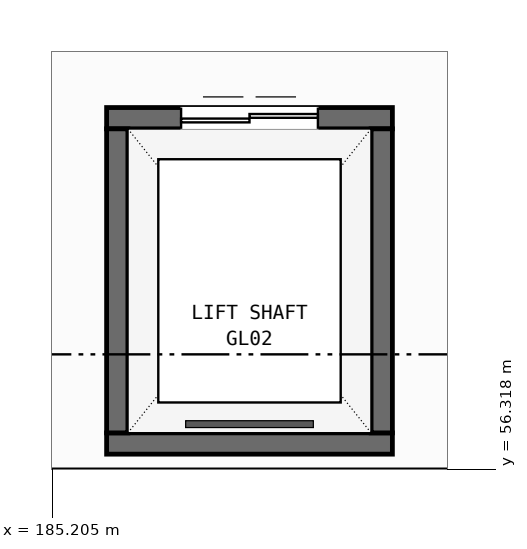
"""IFC4 building model, lengths in metres.
Left out: names, types, materials, properties, quantities, classifications, styles, units other than length and angle.
Written with IfcOpenShell. Run it as: python <this file> out.ifc"""

import sys

from ifc_helpers import new_model, si_unit, direction, frame, frame_2d, origin, place, context, subcontext, project, spatial, rectangle, extrude, element, fill, save


model = new_model("IFC4")
c1 = context("Model", 3, precision=1e-05, world=origin(), true_north=direction((0.0, 1.0)))
c2 = subcontext(c1, "Body", "Model", "MODEL_VIEW")
j1 = project(units=[si_unit("LENGTHUNIT", "METRE"), si_unit("PLANEANGLEUNIT", "RADIAN")], contexts=[c1])
p1 = place(None, origin())
s1 = spatial("IfcSite", under=j1, at=p1, CompositionType="ELEMENT")
p2 = place(p1, origin())
s2 = spatial("IfcBuilding", under=s1, at=p2, CompositionType="ELEMENT")
p3 = place(p2, frame((0.0, 0.0, 6.0)))
s3 = spatial("IfcBuildingStorey", under=s2, at=p3, CompositionType="ELEMENT", Elevation=6.0)
p4 = place(p3, frame((185.92, 56.66, 0.0), z_axis=(0.0, 0.0, 1.0), x_axis=(1.0, 0.0, 0.0)))
e1 = element("IfcWall", 1, at=p4, inside=s3, PredefinedType="SHEAR", context=c2, shape_type="SweptSolid", body=[
    extrude(rectangle(XDim=3.76, YDim=0.28, at=frame_2d((1.88, 0.0))), origin(), (0.0, 0.0, 1.0), 5.4),
])
p5 = place(p3, frame((185.92, 60.94, 0.0), z_axis=(0.0, 0.0, 1.0), x_axis=(1.0, 0.0, 0.0)))
e2 = element("IfcWall", 2, at=p5, inside=s3, PredefinedType="SHEAR", context=c2, shape_type="SweptSolid", body=[
    extrude(rectangle(XDim=3.76, YDim=0.28, at=frame_2d((1.88, 0.0))), origin(), (0.0, 0.0, 1.0), 5.4),
])
p6 = place(p5, frame((0.98, 0.0, 0.0)))
e3 = element("IfcOpeningElement", 3, at=p6, cuts=e2, PredefinedType="OPENING", context=c2, shape_type="SweptSolid", body=[
    extrude(rectangle(XDim=1.8, YDim=2.3, at=frame_2d((0.9, 1.15))), frame((0.0, 0.15, 0.0), z_axis=(0.0, -1.0, 0.0), x_axis=(1.0, 0.0, 0.0)), (0.0, 0.0, 1.0), 0.3),
])
for number, where, z_axis, x_axis in (
    (4, (186.06, 56.8, 0.0), (0.0, 0.0, 1.0), (0.0, 1.0, 0.0)),
    (5, (189.54, 56.8, 0.0), (0.0, 0.0, 1.0), (0.0, 1.0, 0.0)),
):
    element("IfcWall", number, at=place(p3, frame(where, z_axis=z_axis, x_axis=x_axis)), inside=s3, PredefinedType="SHEAR", context=c2, shape_type="SweptSolid", body=[
        extrude(rectangle(XDim=4.0, YDim=0.28, at=frame_2d((2.0, 0.0))), origin(), (0.0, 0.0, 1.0), 5.4),
    ])
p7 = place(p6, origin())
e6 = element("IfcDoor", 6, at=p7, inside=s3, OperationType="DOUBLE_DOOR_SLIDING", PredefinedType="DOOR", context=c2, shape_type="SweptSolid", body=[
    extrude(rectangle(XDim=1.8, YDim=2.3, at=frame_2d((0.9, 1.15))), frame((0.0, 0.025, 0.0), z_axis=(0.0, -1.0, 0.0), x_axis=(1.0, 0.0, 0.0)), (0.0, 0.0, 1.0), 0.05),
])
fill(e3, e6)
save(model, sys.argv[1])
